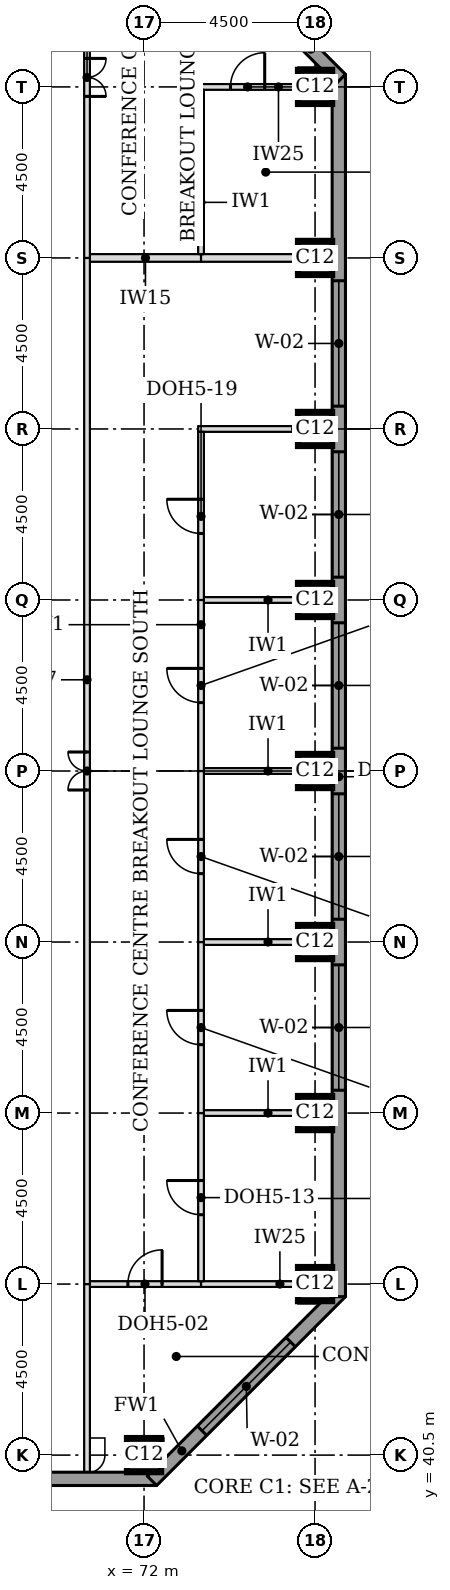
"""IFC4 building model, lengths in metres.
Left out: names, types, materials, properties, quantities, classifications, styles, units other than length and angle.
Written with IfcOpenShell. Run it as: python <this file> out.ifc"""

import sys

from ifc_helpers import new_model, si_unit, direction, frame, frame_2d, origin, origin_2d, place, context, subcontext, project, spatial, rectangle, extrude, element, fill, save


model = new_model("IFC4")
c1 = context("Model", 3, precision=1e-05, world=origin(), true_north=direction((0.0, 1.0)))
c2 = subcontext(c1, "Body", "Model", "MODEL_VIEW")
j1 = project(units=[si_unit("LENGTHUNIT", "METRE"), si_unit("PLANEANGLEUNIT", "RADIAN")], contexts=[c1])
p1 = place(None, origin())
s1 = spatial("IfcSite", under=j1, at=p1, CompositionType="ELEMENT")
p2 = place(p1, origin())
s2 = spatial("IfcBuilding", under=s1, at=p2, CompositionType="ELEMENT")
p3 = place(p2, frame((0.0, 0.0, 181.0)))
s3 = spatial("IfcBuildingStorey", under=s2, at=p3, CompositionType="ELEMENT", Elevation=181.0)
for number, where, z_axis, x_axis in (
    (1, (72.0, 40.5, 0.0), (0.0, 0.0, 1.0), (1.0, 0.0, 0.0)),
    (2, (76.5, 45.0, 0.0), (0.0, 0.0, 1.0), (1.0, 0.0, 0.0)),
    (3, (76.5, 49.5, 0.0), (0.0, 0.0, 1.0), (1.0, 0.0, 0.0)),
    (4, (76.5, 54.0, 0.0), (0.0, 0.0, 1.0), (1.0, 0.0, 0.0)),
    (5, (76.5, 58.5, 0.0), (0.0, 0.0, 1.0), (1.0, 0.0, 0.0)),
    (6, (76.5, 63.0, 0.0), (0.0, 0.0, 1.0), (1.0, 0.0, 0.0)),
    (7, (76.5, 67.5, 0.0), (0.0, 0.0, 1.0), (1.0, 0.0, 0.0)),
    (8, (76.5, 72.0, 0.0), (0.0, 0.0, 1.0), (1.0, 0.0, 0.0)),
    (9, (76.5, 76.5, 0.0), (0.0, 0.0, 1.0), (1.0, 0.0, 0.0)),
):
    element("IfcColumn", number, at=place(p3, frame(where, z_axis=z_axis, x_axis=x_axis)), inside=s3, PredefinedType="COLUMN", context=c2, shape_type="SweptSolid", body=[
        extrude(rectangle(XDim=0.9, YDim=0.9, at=origin_2d()), origin(), (0.0, 0.0, 1.0), 3.7),
    ])
p4 = place(p3, frame((36.0, 39.875, 0.0), z_axis=(0.0, 0.0, 1.0), x_axis=(1.0, 0.0, 0.0)))
e10 = element("IfcWall", 10, at=p4, inside=s3, PredefinedType="STANDARD", context=c2, shape_type="SweptSolid", body=[
    extrude(rectangle(XDim=36.331, YDim=0.35, at=frame_2d((18.166, 0.0))), origin(), (0.0, 0.0, 1.0), 3.525),
])
p5 = place(p4, frame((5.1, 0.0, 0.9)))
e11 = element("IfcOpeningElement", 11, at=p5, cuts=e10, PredefinedType="OPENING", context=c2, shape_type="SweptSolid", body=[
    extrude(rectangle(XDim=3.3, YDim=1.9, at=frame_2d((1.65, 0.95))), frame((0.0, 0.185, 0.0), z_axis=(0.0, -1.0, 0.0), x_axis=(1.0, 0.0, 0.0)), (0.0, 0.0, 1.0), 0.37),
])
p6 = place(p4, frame((9.6, 0.0, 0.9)))
e12 = element("IfcOpeningElement", 12, at=p6, cuts=e10, PredefinedType="OPENING", context=c2, shape_type="SweptSolid", body=[
    extrude(rectangle(XDim=3.3, YDim=1.9, at=frame_2d((1.65, 0.95))), frame((0.0, 0.185, 0.0), z_axis=(0.0, -1.0, 0.0), x_axis=(1.0, 0.0, 0.0)), (0.0, 0.0, 1.0), 0.37),
])
p7 = place(p4, frame((14.1, 0.0, 0.9)))
e13 = element("IfcOpeningElement", 13, at=p7, cuts=e10, PredefinedType="OPENING", context=c2, shape_type="SweptSolid", body=[
    extrude(rectangle(XDim=3.3, YDim=1.9, at=frame_2d((1.65, 0.95))), frame((0.0, 0.185, 0.0), z_axis=(0.0, -1.0, 0.0), x_axis=(1.0, 0.0, 0.0)), (0.0, 0.0, 1.0), 0.37),
])
p8 = place(p4, frame((18.6, 0.0, 0.9)))
e14 = element("IfcOpeningElement", 14, at=p8, cuts=e10, PredefinedType="OPENING", context=c2, shape_type="SweptSolid", body=[
    extrude(rectangle(XDim=3.3, YDim=1.9, at=frame_2d((1.65, 0.95))), frame((0.0, 0.185, 0.0), z_axis=(0.0, -1.0, 0.0), x_axis=(1.0, 0.0, 0.0)), (0.0, 0.0, 1.0), 0.37),
])
p9 = place(p4, frame((23.1, 0.0, 0.9)))
e15 = element("IfcOpeningElement", 15, at=p9, cuts=e10, PredefinedType="OPENING", context=c2, shape_type="SweptSolid", body=[
    extrude(rectangle(XDim=3.3, YDim=1.9, at=frame_2d((1.65, 0.95))), frame((0.0, 0.185, 0.0), z_axis=(0.0, -1.0, 0.0), x_axis=(1.0, 0.0, 0.0)), (0.0, 0.0, 1.0), 0.37),
])
p10 = place(p4, frame((27.6, 0.0, 0.9)))
e16 = element("IfcOpeningElement", 16, at=p10, cuts=e10, PredefinedType="OPENING", context=c2, shape_type="SweptSolid", body=[
    extrude(rectangle(XDim=3.3, YDim=1.9, at=frame_2d((1.65, 0.95))), frame((0.0, 0.185, 0.0), z_axis=(0.0, -1.0, 0.0), x_axis=(1.0, 0.0, 0.0)), (0.0, 0.0, 1.0), 0.37),
])
p11 = place(p3, frame((72.208, 39.824, 0.0), z_axis=(0.0, 0.0, 1.0), x_axis=(0.707106781187, 0.707106781187, 0.0)))
e17 = element("IfcWall", 17, at=p11, inside=s3, PredefinedType="STANDARD", context=c2, shape_type="SweptSolid", body=[
    extrude(rectangle(XDim=7.027, YDim=0.35, at=frame_2d((3.513, 0.0))), origin(), (0.0, 0.0, 1.0), 3.525),
])
p12 = place(p11, frame((1.863, 0.0, 0.9)))
e18 = element("IfcOpeningElement", 18, at=p12, cuts=e17, PredefinedType="OPENING", context=c2, shape_type="SweptSolid", body=[
    extrude(rectangle(XDim=3.3, YDim=1.9, at=frame_2d((1.65, 0.95))), frame((0.0, 0.185, 0.0), z_axis=(0.0, -1.0, 0.0), x_axis=(1.0, 0.0, 0.0)), (0.0, 0.0, 1.0), 0.37),
])
p13 = place(p3, frame((77.125, 44.669, 0.0), z_axis=(0.0, 0.0, 1.0), x_axis=(0.0, 1.0, 0.0)))
e19 = element("IfcWall", 19, at=p13, inside=s3, PredefinedType="STANDARD", context=c2, shape_type="SweptSolid", body=[
    extrude(rectangle(XDim=32.163, YDim=0.35, at=frame_2d((16.081, 0.0))), origin(), (0.0, 0.0, 1.0), 3.525),
])
p14 = place(p13, frame((5.431, 0.0, 0.9)))
e20 = element("IfcOpeningElement", 20, at=p14, cuts=e19, PredefinedType="OPENING", context=c2, shape_type="SweptSolid", body=[
    extrude(rectangle(XDim=3.3, YDim=1.9, at=frame_2d((1.65, 0.95))), frame((0.0, 0.185, 0.0), z_axis=(0.0, -1.0, 0.0), x_axis=(1.0, 0.0, 0.0)), (0.0, 0.0, 1.0), 0.37),
])
p15 = place(p13, frame((9.931, 0.0, 0.9)))
e21 = element("IfcOpeningElement", 21, at=p15, cuts=e19, PredefinedType="OPENING", context=c2, shape_type="SweptSolid", body=[
    extrude(rectangle(XDim=3.3, YDim=1.9, at=frame_2d((1.65, 0.95))), frame((0.0, 0.185, 0.0), z_axis=(0.0, -1.0, 0.0), x_axis=(1.0, 0.0, 0.0)), (0.0, 0.0, 1.0), 0.37),
])
p16 = place(p13, frame((14.431, 0.0, 0.9)))
e22 = element("IfcOpeningElement", 22, at=p16, cuts=e19, PredefinedType="OPENING", context=c2, shape_type="SweptSolid", body=[
    extrude(rectangle(XDim=3.3, YDim=1.9, at=frame_2d((1.65, 0.95))), frame((0.0, 0.185, 0.0), z_axis=(0.0, -1.0, 0.0), x_axis=(1.0, 0.0, 0.0)), (0.0, 0.0, 1.0), 0.37),
])
p17 = place(p13, frame((18.931, 0.0, 0.9)))
e23 = element("IfcOpeningElement", 23, at=p17, cuts=e19, PredefinedType="OPENING", context=c2, shape_type="SweptSolid", body=[
    extrude(rectangle(XDim=3.3, YDim=1.9, at=frame_2d((1.65, 0.95))), frame((0.0, 0.185, 0.0), z_axis=(0.0, -1.0, 0.0), x_axis=(1.0, 0.0, 0.0)), (0.0, 0.0, 1.0), 0.37),
])
p18 = place(p13, frame((23.431, 0.0, 0.9)))
e24 = element("IfcOpeningElement", 24, at=p18, cuts=e19, PredefinedType="OPENING", context=c2, shape_type="SweptSolid", body=[
    extrude(rectangle(XDim=3.3, YDim=1.9, at=frame_2d((1.65, 0.95))), frame((0.0, 0.185, 0.0), z_axis=(0.0, -1.0, 0.0), x_axis=(1.0, 0.0, 0.0)), (0.0, 0.0, 1.0), 0.37),
])
p19 = place(p3, frame((77.176, 76.708, 0.0), z_axis=(0.0, 0.0, 1.0), x_axis=(-0.707106781187, 0.707106781187, 0.0)))
e25 = element("IfcWall", 25, at=p19, inside=s3, PredefinedType="STANDARD", context=c2, shape_type="SweptSolid", body=[
    extrude(rectangle(XDim=7.027, YDim=0.35, at=frame_2d((3.513, 0.0))), origin(), (0.0, 0.0, 1.0), 3.525),
])
p20 = place(p19, frame((1.863, 0.0, 0.9)))
e26 = element("IfcOpeningElement", 26, at=p20, cuts=e25, PredefinedType="OPENING", context=c2, shape_type="SweptSolid", body=[
    extrude(rectangle(XDim=3.3, YDim=1.9, at=frame_2d((1.65, 0.95))), frame((0.0, 0.185, 0.0), z_axis=(0.0, -1.0, 0.0), x_axis=(1.0, 0.0, 0.0)), (0.0, 0.0, 1.0), 0.37),
])
p21 = place(p3, frame((70.575, 45.0, 0.0), z_axis=(0.0, 0.0, 1.0), x_axis=(1.0, 0.0, 0.0)))
e27 = element("IfcWall", 27, at=p21, inside=s3, PredefinedType="PARTITIONING", context=c2, shape_type="SweptSolid", body=[
    extrude(rectangle(XDim=2.925, YDim=0.15, at=frame_2d((1.462, 0.0))), origin(), (0.0, 0.0, 1.0), 3.096),
])
p22 = place(p21, frame((1.0, 0.0, 0.0)))
e28 = element("IfcOpeningElement", 28, at=p22, cuts=e27, PredefinedType="OPENING", context=c2, shape_type="SweptSolid", body=[
    extrude(rectangle(XDim=0.9, YDim=2.1, at=frame_2d((0.45, 1.05))), frame((0.0, 0.085, 0.0), z_axis=(0.0, -1.0, 0.0), x_axis=(1.0, 0.0, 0.0)), (0.0, 0.0, 1.0), 0.17),
])
p23 = place(p3, frame((73.5, 45.0, 0.0), z_axis=(0.0, 0.0, 1.0), x_axis=(1.0, 0.0, 0.0)))
e29 = element("IfcWall", 29, at=p23, inside=s3, PredefinedType="PARTITIONING", context=c2, shape_type="SweptSolid", body=[
    extrude(rectangle(XDim=2.55, YDim=0.15, at=frame_2d((1.275, 0.0))), origin(), (0.0, 0.0, 1.0), 3.096),
])
for number, where, z_axis, x_axis in (
    (30, (73.575, 49.5, 0.0), (0.0, 0.0, 1.0), (1.0, 0.0, 0.0)),
    (31, (73.575, 54.0, 0.0), (0.0, 0.0, 1.0), (1.0, 0.0, 0.0)),
    (32, (73.575, 58.5, 0.0), (0.0, 0.0, 1.0), (1.0, 0.0, 0.0)),
    (33, (73.575, 63.0, 0.0), (0.0, 0.0, 1.0), (1.0, 0.0, 0.0)),
):
    element("IfcWall", number, at=place(p3, frame(where, z_axis=z_axis, x_axis=x_axis)), inside=s3, PredefinedType="PARTITIONING", context=c2, shape_type="SweptSolid", body=[
        extrude(rectangle(XDim=3.375, YDim=0.15, at=frame_2d((1.688, 0.0))), origin(), (0.0, 0.0, 1.0), 3.55),
    ])
p24 = place(p3, frame((73.425, 67.5, 0.0), z_axis=(0.0, 0.0, 1.0), x_axis=(1.0, 0.0, 0.0)))
e34 = element("IfcWall", 34, at=p24, inside=s3, PredefinedType="PARTITIONING", context=c2, shape_type="SweptSolid", body=[
    extrude(rectangle(XDim=3.525, YDim=0.15, at=frame_2d((1.762, 0.0))), origin(), (0.0, 0.0, 1.0), 3.55),
])
p25 = place(p3, frame((70.575, 72.0, 0.0), z_axis=(0.0, 0.0, 1.0), x_axis=(1.0, 0.0, 0.0)))
e35 = element("IfcWall", 35, at=p25, inside=s3, PredefinedType="PARTITIONING", context=c2, shape_type="SweptSolid", body=[
    extrude(rectangle(XDim=2.925, YDim=0.2, at=frame_2d((1.462, 0.0))), origin(), (0.0, 0.0, 1.0), 3.55),
])
p26 = place(p3, frame((73.5, 72.0, 0.0), z_axis=(0.0, 0.0, 1.0), x_axis=(1.0, 0.0, 0.0)))
e36 = element("IfcWall", 36, at=p26, inside=s3, PredefinedType="PARTITIONING", context=c2, shape_type="SweptSolid", body=[
    extrude(rectangle(XDim=3.45, YDim=0.2, at=frame_2d((1.725, 0.0))), origin(), (0.0, 0.0, 1.0), 3.55),
])
p27 = place(p3, frame((73.425, 76.5, 0.0), z_axis=(0.0, 0.0, 1.0), x_axis=(1.0, 0.0, 0.0)))
e37 = element("IfcWall", 37, at=p27, inside=s3, PredefinedType="PARTITIONING", context=c2, shape_type="SweptSolid", body=[
    extrude(rectangle(XDim=2.625, YDim=0.15, at=frame_2d((1.312, 0.0))), origin(), (0.0, 0.0, 1.0), 3.096),
])
p28 = place(p27, frame((0.85, 0.0, 0.0)))
e38 = element("IfcOpeningElement", 38, at=p28, cuts=e37, PredefinedType="OPENING", context=c2, shape_type="SweptSolid", body=[
    extrude(rectangle(XDim=0.9, YDim=2.1, at=frame_2d((0.45, 1.05))), frame((0.0, 0.085, 0.0), z_axis=(0.0, -1.0, 0.0), x_axis=(1.0, 0.0, 0.0)), (0.0, 0.0, 1.0), 0.17),
])
p29 = place(p3, frame((70.5, 40.05, 0.0), z_axis=(0.0, 0.0, 1.0), x_axis=(0.0, 1.0, 0.0)))
e39 = element("IfcWall", 39, at=p29, inside=s3, PredefinedType="PARTITIONING", context=c2, shape_type="SweptSolid", body=[
    extrude(rectangle(XDim=4.95, YDim=0.15, at=frame_2d((2.475, 0.0))), origin(), (0.0, 0.0, 1.0), 3.55),
])
p30 = place(p3, frame((70.5, 45.0, 0.0), z_axis=(0.0, 0.0, 1.0), x_axis=(0.0, 1.0, 0.0)))
e40 = element("IfcWall", 40, at=p30, inside=s3, PredefinedType="PARTITIONING", context=c2, shape_type="SweptSolid", body=[
    extrude(rectangle(XDim=27.0, YDim=0.15, at=frame_2d((13.5, 0.0))), origin(), (0.0, 0.0, 1.0), 3.55),
])
p31 = place(p30, frame((13.0, 0.0, 0.0)))
e41 = element("IfcOpeningElement", 41, at=p31, cuts=e40, PredefinedType="OPENING", context=c2, shape_type="SweptSolid", body=[
    extrude(rectangle(XDim=1.0, YDim=2.1, at=frame_2d((0.5, 1.05))), frame((0.0, 0.085, 0.0), z_axis=(0.0, -1.0, 0.0), x_axis=(1.0, 0.0, 0.0)), (0.0, 0.0, 1.0), 0.17),
])
p32 = place(p3, frame((73.5, 45.075, 0.0), z_axis=(0.0, 0.0, 1.0), x_axis=(0.0, 1.0, 0.0)))
e42 = element("IfcWall", 42, at=p32, inside=s3, PredefinedType="PARTITIONING", context=c2, shape_type="SweptSolid", body=[
    extrude(rectangle(XDim=4.425, YDim=0.15, at=frame_2d((2.212, 0.0))), origin(), (0.0, 0.0, 1.0), 3.55),
])
p33 = place(p32, frame((1.75, 0.0, 0.0)))
e43 = element("IfcOpeningElement", 43, at=p33, cuts=e42, PredefinedType="OPENING", context=c2, shape_type="SweptSolid", body=[
    extrude(rectangle(XDim=0.9, YDim=2.1, at=frame_2d((0.45, 1.05))), frame((0.0, 0.085, 0.0), z_axis=(0.0, -1.0, 0.0), x_axis=(1.0, 0.0, 0.0)), (0.0, 0.0, 1.0), 0.17),
])
p34 = place(p3, frame((73.5, 49.5, 0.0), z_axis=(0.0, 0.0, 1.0), x_axis=(0.0, 1.0, 0.0)))
e44 = element("IfcWall", 44, at=p34, inside=s3, PredefinedType="PARTITIONING", context=c2, shape_type="SweptSolid", body=[
    extrude(rectangle(XDim=4.5, YDim=0.15, at=frame_2d((2.25, 0.0))), origin(), (0.0, 0.0, 1.0), 3.55),
])
p35 = place(p34, frame((1.8, 0.0, 0.0)))
e45 = element("IfcOpeningElement", 45, at=p35, cuts=e44, PredefinedType="OPENING", context=c2, shape_type="SweptSolid", body=[
    extrude(rectangle(XDim=0.9, YDim=2.1, at=frame_2d((0.45, 1.05))), frame((0.0, 0.085, 0.0), z_axis=(0.0, -1.0, 0.0), x_axis=(1.0, 0.0, 0.0)), (0.0, 0.0, 1.0), 0.17),
])
p36 = place(p3, frame((73.5, 54.0, 0.0), z_axis=(0.0, 0.0, 1.0), x_axis=(0.0, 1.0, 0.0)))
e46 = element("IfcWall", 46, at=p36, inside=s3, PredefinedType="PARTITIONING", context=c2, shape_type="SweptSolid", body=[
    extrude(rectangle(XDim=4.5, YDim=0.15, at=frame_2d((2.25, 0.0))), origin(), (0.0, 0.0, 1.0), 3.55),
])
p37 = place(p36, frame((1.8, 0.0, 0.0)))
e47 = element("IfcOpeningElement", 47, at=p37, cuts=e46, PredefinedType="OPENING", context=c2, shape_type="SweptSolid", body=[
    extrude(rectangle(XDim=0.9, YDim=2.1, at=frame_2d((0.45, 1.05))), frame((0.0, 0.085, 0.0), z_axis=(0.0, -1.0, 0.0), x_axis=(1.0, 0.0, 0.0)), (0.0, 0.0, 1.0), 0.17),
])
p38 = place(p3, frame((73.5, 58.5, 0.0), z_axis=(0.0, 0.0, 1.0), x_axis=(0.0, 1.0, 0.0)))
e48 = element("IfcWall", 48, at=p38, inside=s3, PredefinedType="PARTITIONING", context=c2, shape_type="SweptSolid", body=[
    extrude(rectangle(XDim=4.5, YDim=0.15, at=frame_2d((2.25, 0.0))), origin(), (0.0, 0.0, 1.0), 3.55),
])
p39 = place(p38, frame((1.8, 0.0, 0.0)))
e49 = element("IfcOpeningElement", 49, at=p39, cuts=e48, PredefinedType="OPENING", context=c2, shape_type="SweptSolid", body=[
    extrude(rectangle(XDim=0.9, YDim=2.1, at=frame_2d((0.45, 1.05))), frame((0.0, 0.085, 0.0), z_axis=(0.0, -1.0, 0.0), x_axis=(1.0, 0.0, 0.0)), (0.0, 0.0, 1.0), 0.17),
])
p40 = place(p3, frame((73.5, 63.0, 0.0), z_axis=(0.0, 0.0, 1.0), x_axis=(0.0, 1.0, 0.0)))
e50 = element("IfcWall", 50, at=p40, inside=s3, PredefinedType="PARTITIONING", context=c2, shape_type="SweptSolid", body=[
    extrude(rectangle(XDim=4.425, YDim=0.15, at=frame_2d((2.212, 0.0))), origin(), (0.0, 0.0, 1.0), 3.55),
])
p41 = place(p40, frame((1.75, 0.0, 0.0)))
e51 = element("IfcOpeningElement", 51, at=p41, cuts=e50, PredefinedType="OPENING", context=c2, shape_type="SweptSolid", body=[
    extrude(rectangle(XDim=0.9, YDim=2.1, at=frame_2d((0.45, 1.05))), frame((0.0, 0.085, 0.0), z_axis=(0.0, -1.0, 0.0), x_axis=(1.0, 0.0, 0.0)), (0.0, 0.0, 1.0), 0.17),
])
p42 = place(p3, frame((70.5, 72.0, 0.0), z_axis=(0.0, 0.0, 1.0), x_axis=(0.0, 1.0, 0.0)))
e52 = element("IfcWall", 52, at=p42, inside=s3, PredefinedType="PARTITIONING", context=c2, shape_type="SweptSolid", body=[
    extrude(rectangle(XDim=9.45, YDim=0.15, at=frame_2d((4.725, 0.0))), origin(), (0.0, 0.0, 1.0), 3.55),
])
p43 = place(p42, frame((4.25, 0.0, 0.0)))
e53 = element("IfcOpeningElement", 53, at=p43, cuts=e52, PredefinedType="OPENING", context=c2, shape_type="SweptSolid", body=[
    extrude(rectangle(XDim=1.0, YDim=2.1, at=frame_2d((0.5, 1.05))), frame((0.0, 0.085, 0.0), z_axis=(0.0, -1.0, 0.0), x_axis=(1.0, 0.0, 0.0)), (0.0, 0.0, 1.0), 0.17),
])
p44 = place(p3, frame((73.5, 72.1, 0.0), z_axis=(0.0, 0.0, 1.0), x_axis=(0.0, 1.0, 0.0)))
e54 = element("IfcWall", 54, at=p44, inside=s3, PredefinedType="PARTITIONING", context=c2, shape_type="SweptSolid", body=[
    extrude(rectangle(XDim=4.325, YDim=0.15, at=frame_2d((2.163, 0.0))), origin(), (0.0, 0.0, 1.0), 3.55),
])
p45 = place(p12, origin())
e55 = element("IfcWindow", 55, at=p45, inside=s3, PartitioningType="SINGLE_PANEL", PredefinedType="WINDOW", context=c2, shape_type="SweptSolid", body=[
    extrude(rectangle(XDim=3.3, YDim=1.9, at=frame_2d((1.65, 0.95))), frame((0.0, 0.085, 0.0), z_axis=(0.0, -1.0, 0.0), x_axis=(1.0, 0.0, 0.0)), (0.0, 0.0, 1.0), 0.06),
])
fill(e18, e55)
p46 = place(p14, origin())
e56 = element("IfcWindow", 56, at=p46, inside=s3, PartitioningType="SINGLE_PANEL", PredefinedType="WINDOW", context=c2, shape_type="SweptSolid", body=[
    extrude(rectangle(XDim=3.3, YDim=1.9, at=frame_2d((1.65, 0.95))), frame((0.0, 0.085, 0.0), z_axis=(0.0, -1.0, 0.0), x_axis=(1.0, 0.0, 0.0)), (0.0, 0.0, 1.0), 0.06),
])
fill(e20, e56)
p47 = place(p15, origin())
e57 = element("IfcWindow", 57, at=p47, inside=s3, PartitioningType="SINGLE_PANEL", PredefinedType="WINDOW", context=c2, shape_type="SweptSolid", body=[
    extrude(rectangle(XDim=3.3, YDim=1.9, at=frame_2d((1.65, 0.95))), frame((0.0, 0.085, 0.0), z_axis=(0.0, -1.0, 0.0), x_axis=(1.0, 0.0, 0.0)), (0.0, 0.0, 1.0), 0.06),
])
fill(e21, e57)
p48 = place(p16, origin())
e58 = element("IfcWindow", 58, at=p48, inside=s3, PartitioningType="SINGLE_PANEL", PredefinedType="WINDOW", context=c2, shape_type="SweptSolid", body=[
    extrude(rectangle(XDim=3.3, YDim=1.9, at=frame_2d((1.65, 0.95))), frame((0.0, 0.085, 0.0), z_axis=(0.0, -1.0, 0.0), x_axis=(1.0, 0.0, 0.0)), (0.0, 0.0, 1.0), 0.06),
])
fill(e22, e58)
p49 = place(p17, origin())
e59 = element("IfcWindow", 59, at=p49, inside=s3, PartitioningType="SINGLE_PANEL", PredefinedType="WINDOW", context=c2, shape_type="SweptSolid", body=[
    extrude(rectangle(XDim=3.3, YDim=1.9, at=frame_2d((1.65, 0.95))), frame((0.0, 0.085, 0.0), z_axis=(0.0, -1.0, 0.0), x_axis=(1.0, 0.0, 0.0)), (0.0, 0.0, 1.0), 0.06),
])
fill(e23, e59)
p50 = place(p18, origin())
e60 = element("IfcWindow", 60, at=p50, inside=s3, PartitioningType="SINGLE_PANEL", PredefinedType="WINDOW", context=c2, shape_type="SweptSolid", body=[
    extrude(rectangle(XDim=3.3, YDim=1.9, at=frame_2d((1.65, 0.95))), frame((0.0, 0.085, 0.0), z_axis=(0.0, -1.0, 0.0), x_axis=(1.0, 0.0, 0.0)), (0.0, 0.0, 1.0), 0.06),
])
fill(e24, e60)
p51 = place(p31, origin())
e61 = element("IfcDoor", 61, at=p51, inside=s3, OperationType="DOUBLE_DOOR_SINGLE_SWING", PredefinedType="DOOR", context=c2, shape_type="SweptSolid", body=[
    extrude(rectangle(XDim=1.0, YDim=2.1, at=frame_2d((0.5, 1.05))), frame((0.0, 0.025, 0.0), z_axis=(0.0, -1.0, 0.0), x_axis=(1.0, 0.0, 0.0)), (0.0, 0.0, 1.0), 0.05),
])
fill(e41, e61)
p52 = place(p22, origin())
e62 = element("IfcDoor", 62, at=p52, inside=s3, OperationType="SINGLE_SWING_RIGHT", PredefinedType="DOOR", context=c2, shape_type="SweptSolid", body=[
    extrude(rectangle(XDim=0.9, YDim=2.1, at=frame_2d((0.45, 1.05))), frame((0.0, 0.025, 0.0), z_axis=(0.0, -1.0, 0.0), x_axis=(1.0, 0.0, 0.0)), (0.0, 0.0, 1.0), 0.05),
])
fill(e28, e62)
p53 = place(p33, origin())
e63 = element("IfcDoor", 63, at=p53, inside=s3, OperationType="SINGLE_SWING_RIGHT", PredefinedType="DOOR", context=c2, shape_type="SweptSolid", body=[
    extrude(rectangle(XDim=0.9, YDim=2.1, at=frame_2d((0.45, 1.05))), frame((0.0, 0.025, 0.0), z_axis=(0.0, -1.0, 0.0), x_axis=(1.0, 0.0, 0.0)), (0.0, 0.0, 1.0), 0.05),
])
fill(e43, e63)
p54 = place(p35, origin())
e64 = element("IfcDoor", 64, at=p54, inside=s3, OperationType="SINGLE_SWING_RIGHT", PredefinedType="DOOR", context=c2, shape_type="SweptSolid", body=[
    extrude(rectangle(XDim=0.9, YDim=2.1, at=frame_2d((0.45, 1.05))), frame((0.0, 0.025, 0.0), z_axis=(0.0, -1.0, 0.0), x_axis=(1.0, 0.0, 0.0)), (0.0, 0.0, 1.0), 0.05),
])
fill(e45, e64)
p55 = place(p37, origin())
e65 = element("IfcDoor", 65, at=p55, inside=s3, OperationType="SINGLE_SWING_RIGHT", PredefinedType="DOOR", context=c2, shape_type="SweptSolid", body=[
    extrude(rectangle(XDim=0.9, YDim=2.1, at=frame_2d((0.45, 1.05))), frame((0.0, 0.025, 0.0), z_axis=(0.0, -1.0, 0.0), x_axis=(1.0, 0.0, 0.0)), (0.0, 0.0, 1.0), 0.05),
])
fill(e47, e65)
p56 = place(p39, origin())
e66 = element("IfcDoor", 66, at=p56, inside=s3, OperationType="SINGLE_SWING_RIGHT", PredefinedType="DOOR", context=c2, shape_type="SweptSolid", body=[
    extrude(rectangle(XDim=0.9, YDim=2.1, at=frame_2d((0.45, 1.05))), frame((0.0, 0.025, 0.0), z_axis=(0.0, -1.0, 0.0), x_axis=(1.0, 0.0, 0.0)), (0.0, 0.0, 1.0), 0.05),
])
fill(e49, e66)
p57 = place(p41, origin())
e67 = element("IfcDoor", 67, at=p57, inside=s3, OperationType="SINGLE_SWING_RIGHT", PredefinedType="DOOR", context=c2, shape_type="SweptSolid", body=[
    extrude(rectangle(XDim=0.9, YDim=2.1, at=frame_2d((0.45, 1.05))), frame((0.0, 0.025, 0.0), z_axis=(0.0, -1.0, 0.0), x_axis=(1.0, 0.0, 0.0)), (0.0, 0.0, 1.0), 0.05),
])
fill(e51, e67)
p58 = place(p43, frame((1.0, 0.0, 0.0), z_axis=(0.0, 0.0, 1.0), x_axis=(-1.0, 0.0, 0.0)))
e68 = element("IfcDoor", 68, at=p58, inside=s3, OperationType="DOUBLE_DOOR_SINGLE_SWING", PredefinedType="DOOR", context=c2, shape_type="SweptSolid", body=[
    extrude(rectangle(XDim=1.0, YDim=2.1, at=frame_2d((0.5, 1.05))), frame((0.0, 0.025, 0.0), z_axis=(0.0, -1.0, 0.0), x_axis=(1.0, 0.0, 0.0)), (0.0, 0.0, 1.0), 0.05),
])
fill(e53, e68)
p59 = place(p28, origin())
e69 = element("IfcDoor", 69, at=p59, inside=s3, OperationType="SINGLE_SWING_RIGHT", PredefinedType="DOOR", context=c2, shape_type="SweptSolid", body=[
    extrude(rectangle(XDim=0.9, YDim=2.1, at=frame_2d((0.45, 1.05))), frame((0.0, 0.025, 0.0), z_axis=(0.0, -1.0, 0.0), x_axis=(1.0, 0.0, 0.0)), (0.0, 0.0, 1.0), 0.05),
])
fill(e38, e69)
save(model, sys.argv[1])
